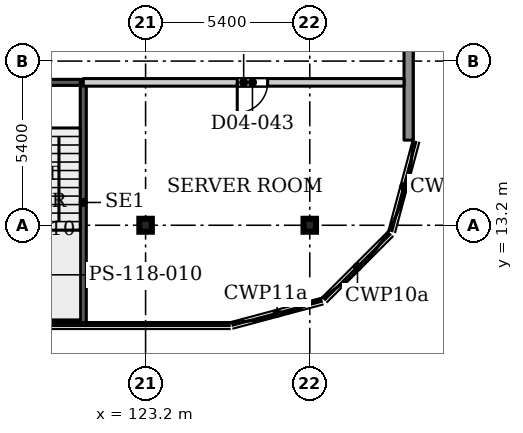
"""IFC4 building model, lengths in metres.
Left out: names, types, materials, properties, quantities, classifications, styles, units other than length and angle.
Written with IfcOpenShell. Run it as: python <this file> out.ifc"""

import sys

from ifc_helpers import new_model, si_unit, direction, frame, frame_2d, origin, origin_2d, place, context, subcontext, project, spatial, rectangle, i_section, extrude, source, transform, mapped, element, fill, save


model = new_model("IFC4")
c1 = context("Model", 3, precision=1e-05, world=origin(), true_north=direction((0.0, 1.0)))
c2 = subcontext(c1, "Body", "Model", "MODEL_VIEW")
j1 = project(units=[si_unit("LENGTHUNIT", "METRE"), si_unit("PLANEANGLEUNIT", "RADIAN")], contexts=[c1])
p1 = place(None, origin())
s1 = spatial("IfcSite", under=j1, at=p1, CompositionType="ELEMENT")
p2 = place(p1, origin())
s2 = spatial("IfcBuilding", under=s1, at=p2, CompositionType="ELEMENT")
p3 = place(p2, frame((0.0, 0.0, 21.5)))
s3 = spatial("IfcBuildingStorey", under=s2, at=p3, CompositionType="ELEMENT", Elevation=21.5)
for number, where, z_axis, x_axis in (
    (1, (123.2, 13.2, 0.0), (0.0, 0.0, 1.0), (1.0, 0.0, 0.0)),
    (2, (128.6, 13.2, 0.0), (0.0, 0.0, 1.0), (1.0, 0.0, 0.0)),
):
    element("IfcColumn", number, at=place(p3, frame(where, z_axis=z_axis, x_axis=x_axis)), inside=s3, PredefinedType="COLUMN", context=c2, shape_type="SweptSolid", body=[
        extrude(i_section(OverallWidth=0.409, OverallDepth=0.425, WebThickness=0.033, FlangeThickness=0.052, FilletRadius=0.013, at=origin_2d()), origin(), (0.0, 0.0, 1.0), 4.5),
    ])
p4 = place(p3, frame((131.85, 54.72, 0.0), z_axis=(0.0, 0.0, 1.0), x_axis=(0.0, -1.0, 0.0)))
e3 = element("IfcWall", 3, at=p4, inside=s3, PredefinedType="SOLIDWALL", context=c2, shape_type="SweptSolid", body=[
    extrude(rectangle(XDim=38.72, YDim=0.3, at=frame_2d((19.36, 0.0))), origin(), (0.0, 0.0, 1.0), 4.25),
])
p5 = place(p4, frame((2.435, 0.0, 0.9)))
e4 = element("IfcOpeningElement", 4, at=p5, cuts=e3, PredefinedType="OPENING", context=c2, shape_type="SweptSolid", body=[
    extrude(rectangle(XDim=2.7, YDim=2.1, at=frame_2d((1.35, 1.05))), frame((0.0, 0.16, 0.0), z_axis=(0.0, -1.0, 0.0), x_axis=(1.0, 0.0, 0.0)), (0.0, 0.0, 1.0), 0.32),
])
p6 = place(p4, frame((13.58, 0.0, 0.9)))
e5 = element("IfcOpeningElement", 5, at=p6, cuts=e3, PredefinedType="OPENING", context=c2, shape_type="SweptSolid", body=[
    extrude(rectangle(XDim=2.7, YDim=2.1, at=frame_2d((1.35, 1.05))), frame((0.0, 0.16, 0.0), z_axis=(0.0, -1.0, 0.0), x_axis=(1.0, 0.0, 0.0)), (0.0, 0.0, 1.0), 0.32),
])
p7 = place(p4, frame((26.16, 0.0, 0.9)))
e6 = element("IfcOpeningElement", 6, at=p7, cuts=e3, PredefinedType="OPENING", context=c2, shape_type="SweptSolid", body=[
    extrude(rectangle(XDim=2.7, YDim=2.1, at=frame_2d((1.35, 1.05))), frame((0.0, 0.16, 0.0), z_axis=(0.0, -1.0, 0.0), x_axis=(1.0, 0.0, 0.0)), (0.0, 0.0, 1.0), 0.32),
])
p8 = place(p3, frame((118.0, 17.9, 0.0), z_axis=(0.0, 0.0, 1.0), x_axis=(1.0, 0.0, 0.0)))
e7 = element("IfcWall", 7, at=p8, inside=s3, PredefinedType="SHEAR", context=c2, shape_type="SweptSolid", body=[
    extrude(rectangle(XDim=3.15, YDim=0.2, at=frame_2d((1.575, 0.0))), origin(), (0.0, 0.0, 1.0), 4.5),
])
p9 = place(p8, frame((0.95, 0.0, 0.0)))
e8 = element("IfcOpeningElement", 8, at=p9, cuts=e7, PredefinedType="OPENING", context=c2, shape_type="SweptSolid", body=[
    extrude(rectangle(XDim=1.1, YDim=2.2, at=frame_2d((0.55, 1.1))), frame((0.0, 0.11, 0.0), z_axis=(0.0, -1.0, 0.0), x_axis=(1.0, 0.0, 0.0)), (0.0, 0.0, 1.0), 0.22),
])
p10 = place(p3, frame((121.15, 10.0, 0.0), z_axis=(0.0, 0.0, 1.0), x_axis=(0.0, 1.0, 0.0)))
e9 = element("IfcWall", 9, at=p10, inside=s3, PredefinedType="SHEAR", context=c2, shape_type="SweptSolid", body=[
    extrude(rectangle(XDim=7.9, YDim=0.2, at=frame_2d((3.95, 0.0))), origin(), (0.0, 0.0, 1.0), 4.5),
])
p11 = place(p3, frame((121.15, 17.9, 0.0), z_axis=(0.0, 0.0, 1.0), x_axis=(1.0, 0.0, 0.0)))
e10 = element("IfcWall", 10, at=p11, inside=s3, PredefinedType="PARTITIONING", context=c2, shape_type="SweptSolid", body=[
    extrude(rectangle(XDim=10.551, YDim=0.25, at=frame_2d((5.275, 0.0))), origin(), (0.0, 0.0, 1.0), 4.18),
])
p12 = place(p11, frame((5.065, 0.0, 0.0)))
e11 = element("IfcOpeningElement", 11, at=p12, cuts=e10, PredefinedType="OPENING", context=c2, shape_type="SweptSolid", body=[
    extrude(rectangle(XDim=1.0, YDim=2.1, at=frame_2d((0.5, 1.05))), frame((0.0, 0.135, 0.0), z_axis=(0.0, -1.0, 0.0), x_axis=(1.0, 0.0, 0.0)), (0.0, 0.0, 1.0), 0.27),
])
m1 = source(origin(), c2, "Body", "SweptSolid", [
    extrude(rectangle(XDim=1.0, YDim=2.1, at=frame_2d((0.5, 1.05))), frame((0.0, 0.025, 0.0), z_axis=(0.0, -1.0, 0.0), x_axis=(1.0, 0.0, 0.0)), (0.0, 0.0, 1.0), 0.05),
])
p13 = place(p12, origin())
e12 = element("IfcDoor", 12, at=p13, inside=s3, OperationType="SINGLE_SWING_RIGHT", PredefinedType="DOOR", context=c2, shape_type="MappedRepresentation", body=[
    mapped(m1, transform((0.0, 0.0, 0.0), x_axis=(1.0, 0.0, 0.0), y_axis=(0.0, 1.0, 0.0), z_axis=(0.0, 0.0, 1.0), scale=1.0)),
])
fill(e11, e12)
save(model, sys.argv[1])
